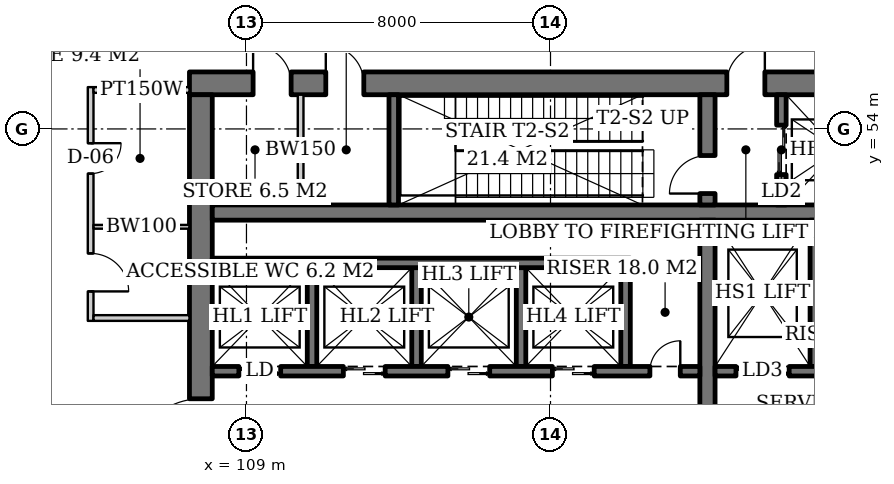
"""IFC4 building model, lengths in metres.
Left out: names, types, materials, properties, quantities, classifications, styles, units other than length and angle.
Written with IfcOpenShell. Run it as: python <this file> out.ifc"""

import sys

from ifc_helpers import new_model, si_unit, direction, frame, frame_2d, origin, place, context, subcontext, project, spatial, rectangle, extrude, element, fill, save


model = new_model("IFC4")
c1 = context("Model", 3, precision=1e-05, world=origin(), true_north=direction((0.0, 1.0)))
c2 = subcontext(c1, "Body", "Model", "MODEL_VIEW")
j1 = project(units=[si_unit("LENGTHUNIT", "METRE"), si_unit("PLANEANGLEUNIT", "RADIAN")], contexts=[c1])
p1 = place(None, origin())
s1 = spatial("IfcSite", under=j1, at=p1, CompositionType="ELEMENT")
p2 = place(p1, origin())
s2 = spatial("IfcBuilding", under=s1, at=p2, CompositionType="ELEMENT")
p3 = place(p2, origin())
s3 = spatial("IfcBuildingStorey", under=s2, at=p3, CompositionType="ELEMENT", Elevation=0.0)
p4 = place(p3, frame((107.5, 55.2, 0.0), z_axis=(0.0, 0.0, 1.0), x_axis=(1.0, 0.0, 0.0)))
e1 = element("IfcWall", 1, at=p4, inside=s3, PredefinedType="SHEAR", context=c2, shape_type="SweptSolid", body=[
    extrude(rectangle(XDim=19.0, YDim=0.6, at=frame_2d((9.5, 0.0))), origin(), (0.0, 0.0, 1.0), 6.0),
])
p5 = place(p4, frame((14.14, 0.0, 0.0)))
e2 = element("IfcOpeningElement", 2, at=p5, cuts=e1, PredefinedType="OPENING", context=c2, shape_type="SweptSolid", body=[
    extrude(rectangle(XDim=1.0, YDim=2.1, at=frame_2d((0.5, 1.05))), frame((0.0, 0.31, 0.0), z_axis=(0.0, -1.0, 0.0), x_axis=(1.0, 0.0, 0.0)), (0.0, 0.0, 1.0), 0.62),
])
p6 = place(p4, frame((1.675, 0.0, 0.0)))
e3 = element("IfcOpeningElement", 3, at=p6, cuts=e1, PredefinedType="OPENING", context=c2, shape_type="SweptSolid", body=[
    extrude(rectangle(XDim=1.0, YDim=2.1, at=frame_2d((0.5, 1.05))), frame((0.0, 0.31, 0.0), z_axis=(0.0, -1.0, 0.0), x_axis=(1.0, 0.0, 0.0)), (0.0, 0.0, 1.0), 0.62),
])
p7 = place(p4, frame((3.587, 0.0, 0.0)))
e4 = element("IfcOpeningElement", 4, at=p7, cuts=e1, PredefinedType="OPENING", context=c2, shape_type="SweptSolid", body=[
    extrude(rectangle(XDim=1.0, YDim=2.1, at=frame_2d((0.5, 1.05))), frame((0.0, 0.31, 0.0), z_axis=(0.0, -1.0, 0.0), x_axis=(1.0, 0.0, 0.0)), (0.0, 0.0, 1.0), 0.62),
])
p8 = place(p3, frame((107.8, 37.1, 0.0), z_axis=(0.0, 0.0, 1.0), x_axis=(0.0, 1.0, 0.0)))
e5 = element("IfcWall", 5, at=p8, inside=s3, PredefinedType="SHEAR", context=c2, shape_type="SweptSolid", body=[
    extrude(rectangle(XDim=17.8, YDim=0.6, at=frame_2d((8.9, 0.0))), origin(), (0.0, 0.0, 1.0), 6.0),
])
p9 = place(p8, frame((8.0, 0.0, 0.0)))
e6 = element("IfcOpeningElement", 6, at=p9, cuts=e5, PredefinedType="OPENING", context=c2, shape_type="SweptSolid", body=[
    extrude(rectangle(XDim=1.8, YDim=2.4, at=frame_2d((0.9, 1.2))), frame((0.0, 0.31, 0.0), z_axis=(0.0, -1.0, 0.0), x_axis=(1.0, 0.0, 0.0)), (0.0, 0.0, 1.0), 0.62),
])
p10 = place(p3, frame((108.1, 51.8, 0.0), z_axis=(0.0, 0.0, 1.0), x_axis=(1.0, 0.0, 0.0)))
e7 = element("IfcWall", 7, at=p10, inside=s3, PredefinedType="SHEAR", context=c2, shape_type="SweptSolid", body=[
    extrude(rectangle(XDim=17.8, YDim=0.4, at=frame_2d((8.9, 0.0))), origin(), (0.0, 0.0, 1.0), 6.0),
])
p11 = place(p3, frame((121.13, 40.4, 0.0), z_axis=(0.0, 0.0, 1.0), x_axis=(0.0, 1.0, 0.0)))
e8 = element("IfcWall", 8, at=p11, inside=s3, PredefinedType="SHEAR", context=c2, shape_type="SweptSolid", body=[
    extrude(rectangle(XDim=11.2, YDim=0.4, at=frame_2d((5.6, 0.0))), origin(), (0.0, 0.0, 1.0), 6.0),
])
p12 = place(p3, frame((121.13, 52.0, 0.0), z_axis=(0.0, 0.0, 1.0), x_axis=(0.0, 1.0, 0.0)))
e9 = element("IfcWall", 9, at=p12, inside=s3, PredefinedType="SHEAR", context=c2, shape_type="SweptSolid", body=[
    extrude(rectangle(XDim=2.9, YDim=0.4, at=frame_2d((1.45, 0.0))), origin(), (0.0, 0.0, 1.0), 6.0),
])
p13 = place(p12, frame((0.3, 0.0, 0.0)))
e10 = element("IfcOpeningElement", 10, at=p13, cuts=e9, PredefinedType="OPENING", context=c2, shape_type="SweptSolid", body=[
    extrude(rectangle(XDim=1.0, YDim=2.1, at=frame_2d((0.5, 1.05))), frame((0.0, 0.21, 0.0), z_axis=(0.0, -1.0, 0.0), x_axis=(1.0, 0.0, 0.0)), (0.0, 0.0, 1.0), 0.42),
])
p14 = place(p3, frame((112.875, 52.0, 0.0), z_axis=(0.0, 0.0, 1.0), x_axis=(0.0, 1.0, 0.0)))
e11 = element("IfcWall", 11, at=p14, inside=s3, PredefinedType="SHEAR", context=c2, shape_type="SweptSolid", body=[
    extrude(rectangle(XDim=2.9, YDim=0.25, at=frame_2d((1.45, 0.0))), origin(), (0.0, 0.0, 1.0), 6.0),
])
p15 = place(p3, frame((123.075, 52.0, 0.0), z_axis=(0.0, 0.0, 1.0), x_axis=(0.0, 1.0, 0.0)))
e12 = element("IfcWall", 12, at=p15, inside=s3, PredefinedType="SHEAR", context=c2, shape_type="SweptSolid", body=[
    extrude(rectangle(XDim=2.9, YDim=0.25, at=frame_2d((1.45, 0.0))), origin(), (0.0, 0.0, 1.0), 6.0),
])
p16 = place(p15, frame((0.8, 0.0, 0.0)))
e13 = element("IfcOpeningElement", 13, at=p16, cuts=e12, PredefinedType="OPENING", context=c2, shape_type="SweptSolid", body=[
    extrude(rectangle(XDim=1.3, YDim=2.2, at=frame_2d((0.65, 1.1))), frame((0.0, 0.135, 0.0), z_axis=(0.0, -1.0, 0.0), x_axis=(1.0, 0.0, 0.0)), (0.0, 0.0, 1.0), 0.27),
])
for number, where, z_axis, x_axis in (
    (14, (110.725, 47.75, 0.0), (0.0, 0.0, 1.0), (0.0, 1.0, 0.0)),
    (15, (113.475, 47.75, 0.0), (0.0, 0.0, 1.0), (0.0, 1.0, 0.0)),
    (16, (116.225, 47.75, 0.0), (0.0, 0.0, 1.0), (0.0, 1.0, 0.0)),
    (17, (118.975, 47.75, 0.0), (0.0, 0.0, 1.0), (0.0, 1.0, 0.0)),
):
    element("IfcWall", number, at=place(p3, frame(where, z_axis=z_axis, x_axis=x_axis)), inside=s3, PredefinedType="SHEAR", context=c2, shape_type="SweptSolid", body=[
        extrude(rectangle(XDim=2.6, YDim=0.25, at=frame_2d((1.3, 0.0))), origin(), (0.0, 0.0, 1.0), 6.0),
    ])
p17 = place(p3, frame((108.1, 50.475, 0.0), z_axis=(0.0, 0.0, 1.0), x_axis=(1.0, 0.0, 0.0)))
e18 = element("IfcWall", 18, at=p17, inside=s3, PredefinedType="SHEAR", context=c2, shape_type="SweptSolid", body=[
    extrude(rectangle(XDim=11.0, YDim=0.25, at=frame_2d((5.5, 0.0))), origin(), (0.0, 0.0, 1.0), 6.0),
])
p18 = place(p3, frame((108.1, 47.625, 0.0), z_axis=(0.0, 0.0, 1.0), x_axis=(1.0, 0.0, 0.0)))
e19 = element("IfcWall", 19, at=p18, inside=s3, PredefinedType="SHEAR", context=c2, shape_type="SweptSolid", body=[
    extrude(rectangle(XDim=12.83, YDim=0.25, at=frame_2d((6.415, 0.0))), origin(), (0.0, 0.0, 1.0), 6.0),
])
p19 = place(p18, frame((0.7, 0.0, 0.0)))
e20 = element("IfcOpeningElement", 20, at=p19, cuts=e19, PredefinedType="OPENING", context=c2, shape_type="SweptSolid", body=[
    extrude(rectangle(XDim=1.1, YDim=2.2, at=frame_2d((0.55, 1.1))), frame((0.0, 0.135, 0.0), z_axis=(0.0, -1.0, 0.0), x_axis=(1.0, 0.0, 0.0)), (0.0, 0.0, 1.0), 0.27),
])
p20 = place(p18, frame((3.45, 0.0, 0.0)))
e21 = element("IfcOpeningElement", 21, at=p20, cuts=e19, PredefinedType="OPENING", context=c2, shape_type="SweptSolid", body=[
    extrude(rectangle(XDim=1.1, YDim=2.2, at=frame_2d((0.55, 1.1))), frame((0.0, 0.135, 0.0), z_axis=(0.0, -1.0, 0.0), x_axis=(1.0, 0.0, 0.0)), (0.0, 0.0, 1.0), 0.27),
])
p21 = place(p18, frame((6.2, 0.0, 0.0)))
e22 = element("IfcOpeningElement", 22, at=p21, cuts=e19, PredefinedType="OPENING", context=c2, shape_type="SweptSolid", body=[
    extrude(rectangle(XDim=1.1, YDim=2.2, at=frame_2d((0.55, 1.1))), frame((0.0, 0.135, 0.0), z_axis=(0.0, -1.0, 0.0), x_axis=(1.0, 0.0, 0.0)), (0.0, 0.0, 1.0), 0.27),
])
p22 = place(p18, frame((8.95, 0.0, 0.0)))
e23 = element("IfcOpeningElement", 23, at=p22, cuts=e19, PredefinedType="OPENING", context=c2, shape_type="SweptSolid", body=[
    extrude(rectangle(XDim=1.1, YDim=2.2, at=frame_2d((0.55, 1.1))), frame((0.0, 0.135, 0.0), z_axis=(0.0, -1.0, 0.0), x_axis=(1.0, 0.0, 0.0)), (0.0, 0.0, 1.0), 0.27),
])
p23 = place(p18, frame((11.515, 0.0, 0.0)))
e24 = element("IfcOpeningElement", 24, at=p23, cuts=e19, PredefinedType="OPENING", context=c2, shape_type="SweptSolid", body=[
    extrude(rectangle(XDim=0.8, YDim=2.0, at=frame_2d((0.4, 1.0))), frame((0.0, 0.135, 0.0), z_axis=(0.0, -1.0, 0.0), x_axis=(1.0, 0.0, 0.0)), (0.0, 0.0, 1.0), 0.27),
])
p24 = place(p3, frame((123.955, 47.75, 0.0), z_axis=(0.0, 0.0, 1.0), x_axis=(0.0, 1.0, 0.0)))
e25 = element("IfcWall", 25, at=p24, inside=s3, PredefinedType="SHEAR", context=c2, shape_type="SweptSolid", body=[
    extrude(rectangle(XDim=3.85, YDim=0.25, at=frame_2d((1.925, 0.0))), origin(), (0.0, 0.0, 1.0), 6.0),
])
p25 = place(p3, frame((121.33, 47.625, 0.0), z_axis=(0.0, 0.0, 1.0), x_axis=(1.0, 0.0, 0.0)))
e26 = element("IfcWall", 26, at=p25, inside=s3, PredefinedType="SHEAR", context=c2, shape_type="SweptSolid", body=[
    extrude(rectangle(XDim=4.57, YDim=0.25, at=frame_2d((2.285, 0.0))), origin(), (0.0, 0.0, 1.0), 6.0),
])
p26 = place(p25, frame((0.55, 0.0, 0.0)))
e27 = element("IfcOpeningElement", 27, at=p26, cuts=e26, PredefinedType="OPENING", context=c2, shape_type="SweptSolid", body=[
    extrude(rectangle(XDim=1.4, YDim=2.4, at=frame_2d((0.7, 1.2))), frame((0.0, 0.135, 0.0), z_axis=(0.0, -1.0, 0.0), x_axis=(1.0, 0.0, 0.0)), (0.0, 0.0, 1.0), 0.27),
])
p27 = place(p25, frame((3.26, 0.0, 0.0)))
e28 = element("IfcOpeningElement", 28, at=p27, cuts=e26, PredefinedType="OPENING", context=c2, shape_type="SweptSolid", body=[
    extrude(rectangle(XDim=0.8, YDim=2.0, at=frame_2d((0.4, 1.0))), frame((0.0, 0.135, 0.0), z_axis=(0.0, -1.0, 0.0), x_axis=(1.0, 0.0, 0.0)), (0.0, 0.0, 1.0), 0.27),
])
p28 = place(p3, frame((110.425, 52.0, 0.0), z_axis=(0.0, 0.0, 1.0), x_axis=(0.0, 1.0, 0.0)))
e29 = element("IfcWall", 29, at=p28, inside=s3, PredefinedType="SOLIDWALL", context=c2, shape_type="SweptSolid", body=[
    extrude(rectangle(XDim=2.9, YDim=0.15, at=frame_2d((1.45, 0.0))), origin(), (0.0, 0.0, 1.0), 5.7),
])
p29 = place(p3, frame((104.9, 55.1, 0.0), z_axis=(0.0, 0.0, 1.0), x_axis=(0.0, -1.0, 0.0)))
e30 = element("IfcWall", 30, at=p29, inside=s3, PredefinedType="PARTITIONING", context=c2, shape_type="SweptSolid", body=[
    extrude(rectangle(XDim=6.15, YDim=0.15, at=frame_2d((3.075, 0.0))), origin(), (0.0, 0.0, 1.0), 4.9),
])
p30 = place(p29, frame((1.475, 0.0, 0.0)))
e31 = element("IfcOpeningElement", 31, at=p30, cuts=e30, PredefinedType="OPENING", context=c2, shape_type="SweptSolid", body=[
    extrude(rectangle(XDim=0.8, YDim=2.1, at=frame_2d((0.4, 1.05))), frame((0.0, 0.085, 0.0), z_axis=(0.0, -1.0, 0.0), x_axis=(1.0, 0.0, 0.0)), (0.0, 0.0, 1.0), 0.17),
])
p31 = place(p29, frame((4.375, 0.0, 0.0)))
e32 = element("IfcOpeningElement", 32, at=p31, cuts=e30, PredefinedType="OPENING", context=c2, shape_type="SweptSolid", body=[
    extrude(rectangle(XDim=1.0, YDim=2.1, at=frame_2d((0.5, 1.05))), frame((0.0, 0.085, 0.0), z_axis=(0.0, -1.0, 0.0), x_axis=(1.0, 0.0, 0.0)), (0.0, 0.0, 1.0), 0.17),
])
p32 = place(p3, frame((104.975, 55.025, 0.0), z_axis=(0.0, 0.0, 1.0), x_axis=(1.0, 0.0, 0.0)))
e33 = element("IfcWall", 33, at=p32, inside=s3, PredefinedType="PARTITIONING", context=c2, shape_type="SweptSolid", body=[
    extrude(rectangle(XDim=2.525, YDim=0.15, at=frame_2d((1.262, 0.0))), origin(), (0.0, 0.0, 1.0), 4.9),
])
p33 = place(p3, frame((104.975, 51.425, 0.0), z_axis=(0.0, 0.0, 1.0), x_axis=(1.0, 0.0, 0.0)))
e34 = element("IfcWall", 34, at=p33, inside=s3, PredefinedType="SOLIDWALL", context=c2, shape_type="SweptSolid", body=[
    extrude(rectangle(XDim=2.525, YDim=0.1, at=frame_2d((1.262, 0.0))), origin(), (0.0, 0.0, 1.0), 5.7),
])
p34 = place(p3, frame((104.975, 49.025, 0.0), z_axis=(0.0, 0.0, 1.0), x_axis=(1.0, 0.0, 0.0)))
e35 = element("IfcWall", 35, at=p34, inside=s3, PredefinedType="PARTITIONING", context=c2, shape_type="SweptSolid", body=[
    extrude(rectangle(XDim=2.525, YDim=0.15, at=frame_2d((1.262, 0.0))), origin(), (0.0, 0.0, 1.0), 5.7),
])
p35 = place(p16, origin())
e36 = element("IfcDoor", 36, at=p35, inside=s3, OperationType="DOUBLE_DOOR_SLIDING", PredefinedType="DOOR", context=c2, shape_type="SweptSolid", body=[
    extrude(rectangle(XDim=1.3, YDim=2.2, at=frame_2d((0.65, 1.1))), frame((0.0, 0.025, 0.0), z_axis=(0.0, -1.0, 0.0), x_axis=(1.0, 0.0, 0.0)), (0.0, 0.0, 1.0), 0.05),
])
fill(e13, e36)
p36 = place(p19, origin())
e37 = element("IfcDoor", 37, at=p36, inside=s3, OperationType="DOUBLE_DOOR_SLIDING", PredefinedType="DOOR", context=c2, shape_type="SweptSolid", body=[
    extrude(rectangle(XDim=1.1, YDim=2.2, at=frame_2d((0.55, 1.1))), frame((0.0, 0.025, 0.0), z_axis=(0.0, -1.0, 0.0), x_axis=(1.0, 0.0, 0.0)), (0.0, 0.0, 1.0), 0.05),
])
fill(e20, e37)
p37 = place(p20, origin())
e38 = element("IfcDoor", 38, at=p37, inside=s3, OperationType="DOUBLE_DOOR_SLIDING", PredefinedType="DOOR", context=c2, shape_type="SweptSolid", body=[
    extrude(rectangle(XDim=1.1, YDim=2.2, at=frame_2d((0.55, 1.1))), frame((0.0, 0.025, 0.0), z_axis=(0.0, -1.0, 0.0), x_axis=(1.0, 0.0, 0.0)), (0.0, 0.0, 1.0), 0.05),
])
fill(e21, e38)
p38 = place(p21, origin())
e39 = element("IfcDoor", 39, at=p38, inside=s3, OperationType="DOUBLE_DOOR_SLIDING", PredefinedType="DOOR", context=c2, shape_type="SweptSolid", body=[
    extrude(rectangle(XDim=1.1, YDim=2.2, at=frame_2d((0.55, 1.1))), frame((0.0, 0.025, 0.0), z_axis=(0.0, -1.0, 0.0), x_axis=(1.0, 0.0, 0.0)), (0.0, 0.0, 1.0), 0.05),
])
fill(e22, e39)
p39 = place(p22, origin())
e40 = element("IfcDoor", 40, at=p39, inside=s3, OperationType="DOUBLE_DOOR_SLIDING", PredefinedType="DOOR", context=c2, shape_type="SweptSolid", body=[
    extrude(rectangle(XDim=1.1, YDim=2.2, at=frame_2d((0.55, 1.1))), frame((0.0, 0.025, 0.0), z_axis=(0.0, -1.0, 0.0), x_axis=(1.0, 0.0, 0.0)), (0.0, 0.0, 1.0), 0.05),
])
fill(e23, e40)
p40 = place(p23, origin())
e41 = element("IfcDoor", 41, at=p40, inside=s3, OperationType="SINGLE_SWING_RIGHT", PredefinedType="DOOR", context=c2, shape_type="SweptSolid", body=[
    extrude(rectangle(XDim=0.8, YDim=2.0, at=frame_2d((0.4, 1.0))), frame((0.0, 0.025, 0.0), z_axis=(0.0, -1.0, 0.0), x_axis=(1.0, 0.0, 0.0)), (0.0, 0.0, 1.0), 0.05),
])
fill(e24, e41)
p41 = place(p26, origin())
e42 = element("IfcDoor", 42, at=p41, inside=s3, OperationType="DOUBLE_DOOR_SLIDING", PredefinedType="DOOR", context=c2, shape_type="SweptSolid", body=[
    extrude(rectangle(XDim=1.4, YDim=2.4, at=frame_2d((0.7, 1.2))), frame((0.0, 0.025, 0.0), z_axis=(0.0, -1.0, 0.0), x_axis=(1.0, 0.0, 0.0)), (0.0, 0.0, 1.0), 0.05),
])
fill(e27, e42)
p42 = place(p13, origin())
e43 = element("IfcDoor", 43, at=p42, inside=s3, OperationType="SINGLE_SWING_LEFT", PredefinedType="DOOR", context=c2, shape_type="SweptSolid", body=[
    extrude(rectangle(XDim=1.0, YDim=2.1, at=frame_2d((0.5, 1.05))), frame((0.0, 0.025, 0.0), z_axis=(0.0, -1.0, 0.0), x_axis=(1.0, 0.0, 0.0)), (0.0, 0.0, 1.0), 0.05),
])
fill(e10, e43)
p43 = place(p5, origin())
e44 = element("IfcDoor", 44, at=p43, inside=s3, OperationType="SINGLE_SWING_RIGHT", PredefinedType="DOOR", context=c2, shape_type="SweptSolid", body=[
    extrude(rectangle(XDim=1.0, YDim=2.1, at=frame_2d((0.5, 1.05))), frame((0.0, 0.025, 0.0), z_axis=(0.0, -1.0, 0.0), x_axis=(1.0, 0.0, 0.0)), (0.0, 0.0, 1.0), 0.05),
])
fill(e2, e44)
p44 = place(p9, origin())
e45 = element("IfcDoor", 45, at=p44, inside=s3, OperationType="DOUBLE_DOOR_SINGLE_SWING", PredefinedType="DOOR", context=c2, shape_type="SweptSolid", body=[
    extrude(rectangle(XDim=1.8, YDim=2.4, at=frame_2d((0.9, 1.2))), frame((0.0, 0.025, 0.0), z_axis=(0.0, -1.0, 0.0), x_axis=(1.0, 0.0, 0.0)), (0.0, 0.0, 1.0), 0.05),
])
fill(e6, e45)
p45 = place(p6, origin())
e46 = element("IfcDoor", 46, at=p45, inside=s3, OperationType="SINGLE_SWING_LEFT", PredefinedType="DOOR", context=c2, shape_type="SweptSolid", body=[
    extrude(rectangle(XDim=1.0, YDim=2.1, at=frame_2d((0.5, 1.05))), frame((0.0, -0.24, 0.0), z_axis=(0.0, -1.0, 0.0), x_axis=(1.0, 0.0, 0.0)), (0.0, 0.0, 1.0), 0.05),
])
fill(e3, e46)
p46 = place(p7, origin())
e47 = element("IfcDoor", 47, at=p46, inside=s3, OperationType="SINGLE_SWING_LEFT", PredefinedType="DOOR", context=c2, shape_type="SweptSolid", body=[
    extrude(rectangle(XDim=1.0, YDim=2.1, at=frame_2d((0.5, 1.05))), frame((0.0, -0.24, 0.0), z_axis=(0.0, -1.0, 0.0), x_axis=(1.0, 0.0, 0.0)), (0.0, 0.0, 1.0), 0.05),
])
fill(e4, e47)
p47 = place(p30, origin())
e48 = element("IfcDoor", 48, at=p47, inside=s3, OperationType="SINGLE_SWING_LEFT", PredefinedType="DOOR", context=c2, shape_type="SweptSolid", body=[
    extrude(rectangle(XDim=0.8, YDim=2.1, at=frame_2d((0.4, 1.05))), frame((0.0, 0.025, 0.0), z_axis=(0.0, -1.0, 0.0), x_axis=(1.0, 0.0, 0.0)), (0.0, 0.0, 1.0), 0.05),
])
fill(e31, e48)
p48 = place(p31, origin())
e49 = element("IfcDoor", 49, at=p48, inside=s3, OperationType="SINGLE_SWING_RIGHT", PredefinedType="DOOR", context=c2, shape_type="SweptSolid", body=[
    extrude(rectangle(XDim=1.0, YDim=2.1, at=frame_2d((0.5, 1.05))), frame((0.0, 0.025, 0.0), z_axis=(0.0, -1.0, 0.0), x_axis=(1.0, 0.0, 0.0)), (0.0, 0.0, 1.0), 0.05),
])
fill(e32, e49)
save(model, sys.argv[1])
